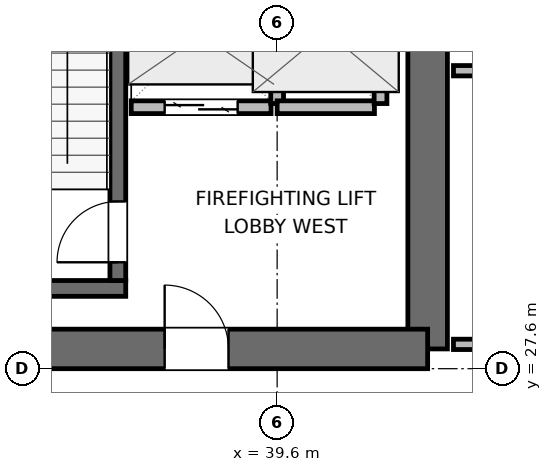
"""IFC4 building model, lengths in metres.
Left out: names, types, materials, properties, quantities, classifications, styles, units other than length and angle.
Written with IfcOpenShell. Run it as: python <this file> out.ifc"""

import sys

from ifc_helpers import new_model, si_unit, direction, frame, frame_2d, origin, place, context, subcontext, project, spatial, rectangle, extrude, element, fill, save


model = new_model("IFC4")
c1 = context("Model", 3, precision=1e-05, world=origin(), true_north=direction((0.0, 1.0)))
c2 = subcontext(c1, "Body", "Model", "MODEL_VIEW")
j1 = project(units=[si_unit("LENGTHUNIT", "METRE"), si_unit("PLANEANGLEUNIT", "RADIAN")], contexts=[c1])
p1 = place(None, origin())
s1 = spatial("IfcSite", under=j1, at=p1, CompositionType="ELEMENT")
p2 = place(p1, origin())
s2 = spatial("IfcBuilding", under=s1, at=p2, CompositionType="ELEMENT")
p3 = place(p2, frame((0.0, 0.0, 201.9)))
s3 = spatial("IfcBuildingStorey", under=s2, at=p3, CompositionType="ELEMENT", Elevation=201.9)
p4 = place(p3, frame((42.075, 27.925, 0.0), z_axis=(0.0, 0.0, 1.0), x_axis=(0.0, 1.0, 0.0)))
e1 = element("IfcWall", 1, at=p4, inside=s3, PredefinedType="SHEAR", context=c2, shape_type="SweptSolid", body=[
    extrude(rectangle(XDim=6.475, YDim=0.65, at=frame_2d((3.237, 0.0))), origin(), (0.0, 0.0, 1.0), 3.9),
])
p5 = place(p3, frame((32.725, 27.925, 0.0), z_axis=(0.0, 0.0, 1.0), x_axis=(1.0, 0.0, 0.0)))
e2 = element("IfcWall", 2, at=p5, inside=s3, PredefinedType="SHEAR", context=c2, shape_type="SweptSolid", body=[
    extrude(rectangle(XDim=9.35, YDim=0.65, at=frame_2d((4.675, 0.0))), origin(), (0.0, 0.0, 1.0), 3.9),
])
p6 = place(p5, frame((5.025, 0.0, 0.0)))
e3 = element("IfcOpeningElement", 3, at=p6, cuts=e2, PredefinedType="OPENING", context=c2, shape_type="SweptSolid", body=[
    extrude(rectangle(XDim=1.05, YDim=2.04, at=frame_2d((0.525, 1.02))), frame((0.0, 0.335, 0.0), z_axis=(0.0, -1.0, 0.0), x_axis=(1.0, 0.0, 0.0)), (0.0, 0.0, 1.0), 0.67),
])
p7 = place(p3, frame((33.05, 28.92, 0.0), z_axis=(0.0, 0.0, 1.0), x_axis=(1.0, 0.0, 0.0)))
e4 = element("IfcWall", 4, at=p7, inside=s3, PredefinedType="SHEAR", context=c2, shape_type="SweptSolid", body=[
    extrude(rectangle(XDim=4.06, YDim=0.26, at=frame_2d((2.03, 0.0))), origin(), (0.0, 0.0, 1.0), 3.9),
])
p8 = place(p3, frame((36.98, 29.05, 0.0), z_axis=(0.0, 0.0, 1.0), x_axis=(0.0, 1.0, 0.0)))
e5 = element("IfcWall", 5, at=p8, inside=s3, PredefinedType="SHEAR", context=c2, shape_type="SweptSolid", body=[
    extrude(rectangle(XDim=7.6, YDim=0.26, at=frame_2d((3.8, 0.0))), origin(), (0.0, 0.0, 1.0), 3.9),
])
p9 = place(p8, frame((0.3, 0.0, 0.0)))
e6 = element("IfcOpeningElement", 6, at=p9, cuts=e5, PredefinedType="OPENING", context=c2, shape_type="SweptSolid", body=[
    extrude(rectangle(XDim=1.0, YDim=2.04, at=frame_2d((0.5, 1.02))), frame((0.0, 0.14, 0.0), z_axis=(0.0, -1.0, 0.0), x_axis=(1.0, 0.0, 0.0)), (0.0, 0.0, 1.0), 0.28),
])
p10 = place(p3, frame((37.2, 31.9, 0.0), z_axis=(0.0, 0.0, 1.0), x_axis=(1.0, 0.0, 0.0)))
e7 = element("IfcWall", 7, at=p10, inside=s3, PredefinedType="PARTITIONING", context=c2, shape_type="SweptSolid", body=[
    extrude(rectangle(XDim=2.3, YDim=0.21, at=frame_2d((1.15, 0.0))), origin(), (0.0, 0.0, 1.0), 3.68),
])
p11 = place(p10, frame((0.55, 0.0, 0.0)))
e8 = element("IfcOpeningElement", 8, at=p11, cuts=e7, PredefinedType="OPENING", context=c2, shape_type="SweptSolid", body=[
    extrude(rectangle(XDim=1.2, YDim=2.04, at=frame_2d((0.6, 1.02))), frame((0.0, 0.115, 0.0), z_axis=(0.0, -1.0, 0.0), x_axis=(1.0, 0.0, 0.0)), (0.0, 0.0, 1.0), 0.23),
])
p12 = place(p3, frame((39.6, 31.96, 0.0), z_axis=(0.0, 0.0, 1.0), x_axis=(0.0, 1.0, 0.0)))
e9 = element("IfcWall", 9, at=p12, inside=s3, PredefinedType="PARTITIONING", context=c2, shape_type="SweptSolid", body=[
    extrude(rectangle(XDim=2.28, YDim=0.21, at=frame_2d((1.14, 0.0))), origin(), (0.0, 0.0, 1.0), 3.68),
])
p13 = place(p3, frame((39.6, 31.9, 0.0), z_axis=(0.0, 0.0, 1.0), x_axis=(1.0, 0.0, 0.0)))
e10 = element("IfcWall", 10, at=p13, inside=s3, PredefinedType="PARTITIONING", context=c2, shape_type="SweptSolid", body=[
    extrude(rectangle(XDim=1.6, YDim=0.21, at=frame_2d((0.8, 0.0))), origin(), (0.0, 0.0, 1.0), 3.68),
])
p14 = place(p3, frame((41.3, 31.96, 0.0), z_axis=(0.0, 0.0, 1.0), x_axis=(0.0, 1.0, 0.0)))
e11 = element("IfcWall", 11, at=p14, inside=s3, PredefinedType="PARTITIONING", context=c2, shape_type="SweptSolid", body=[
    extrude(rectangle(XDim=2.38, YDim=0.21, at=frame_2d((1.19, 0.0))), origin(), (0.0, 0.0, 1.0), 3.68),
])
p15 = place(p3, frame((42.5, 28.0, 0.0), z_axis=(0.0, 0.0, 1.0), x_axis=(1.0, 0.0, 0.0)))
e12 = element("IfcWall", 12, at=p15, inside=s3, PredefinedType="PARTITIONING", context=c2, shape_type="SweptSolid", body=[
    extrude(rectangle(XDim=4.213, YDim=0.17, at=frame_2d((2.106, 0.0))), origin(), (0.0, 0.0, 1.0), 2.765),
])
p16 = place(p3, frame((42.5, 32.5, 0.0), z_axis=(0.0, 0.0, 1.0), x_axis=(1.0, 0.0, 0.0)))
e13 = element("IfcWall", 13, at=p16, inside=s3, PredefinedType="PARTITIONING", context=c2, shape_type="SweptSolid", body=[
    extrude(rectangle(XDim=1.3, YDim=0.17, at=frame_2d((0.65, 0.0))), origin(), (0.0, 0.0, 1.0), 3.68),
])
p17 = place(p9, origin())
e14 = element("IfcDoor", 14, at=p17, inside=s3, OperationType="SINGLE_SWING_LEFT", PredefinedType="DOOR", context=c2, shape_type="SweptSolid", body=[
    extrude(rectangle(XDim=1.0, YDim=2.04, at=frame_2d((0.5, 1.02))), frame((0.0, 0.025, 0.0), z_axis=(0.0, -1.0, 0.0), x_axis=(1.0, 0.0, 0.0)), (0.0, 0.0, 1.0), 0.05),
])
fill(e6, e14)
p18 = place(p11, origin())
e15 = element("IfcDoor", 15, at=p18, inside=s3, OperationType="DOUBLE_DOOR_SLIDING", PredefinedType="DOOR", context=c2, shape_type="SweptSolid", body=[
    extrude(rectangle(XDim=1.2, YDim=2.04, at=frame_2d((0.6, 1.02))), frame((0.0, 0.025, 0.0), z_axis=(0.0, -1.0, 0.0), x_axis=(1.0, 0.0, 0.0)), (0.0, 0.0, 1.0), 0.05),
])
fill(e8, e15)
p19 = place(p6, origin())
e16 = element("IfcDoor", 16, at=p19, inside=s3, OperationType="SINGLE_SWING_LEFT", PredefinedType="DOOR", context=c2, shape_type="SweptSolid", body=[
    extrude(rectangle(XDim=1.05, YDim=2.04, at=frame_2d((0.525, 1.02))), frame((0.0, 0.025, 0.0), z_axis=(0.0, -1.0, 0.0), x_axis=(1.0, 0.0, 0.0)), (0.0, 0.0, 1.0), 0.05),
])
fill(e3, e16)
save(model, sys.argv[1])
